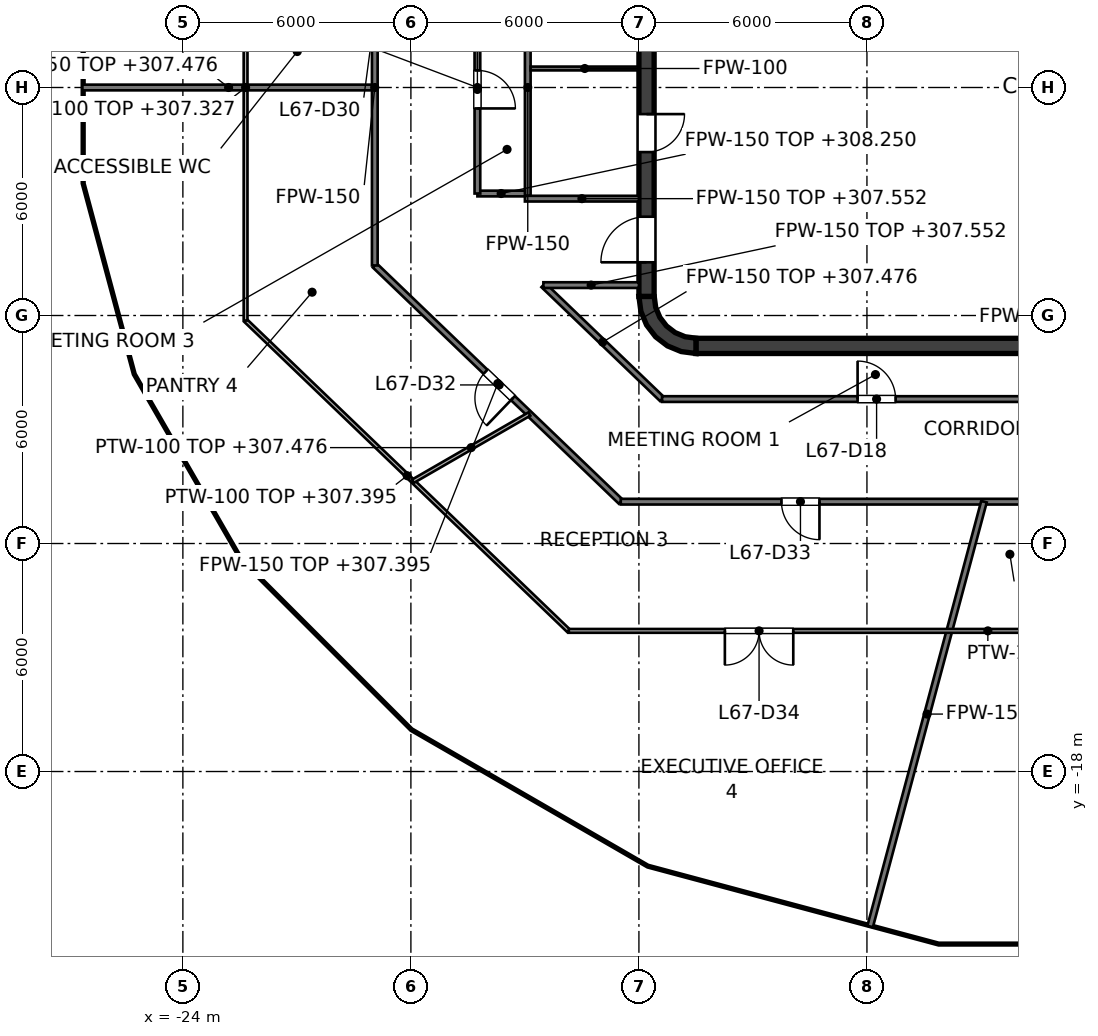
"""IFC4 building model, lengths in metres.
Left out: names, types, materials, properties, quantities, classifications, styles, units other than length and angle.
Written with IfcOpenShell. Run it as: python <this file> out.ifc"""

import sys

from ifc_helpers import new_model, si_unit, direction, frame, frame_2d, origin, place, context, subcontext, project, spatial, polyline, rectangle, outline, extrude, element, fill, save


model = new_model("IFC4")
c1 = context("Model", 3, precision=1e-05, world=origin(), true_north=direction((0.0, 1.0)))
c2 = subcontext(c1, "Body", "Model", "MODEL_VIEW")
j1 = project(units=[si_unit("LENGTHUNIT", "METRE"), si_unit("PLANEANGLEUNIT", "RADIAN")], contexts=[c1])
p1 = place(None, origin())
s1 = spatial("IfcSite", under=j1, at=p1, CompositionType="ELEMENT")
p2 = place(p1, origin())
s2 = spatial("IfcBuilding", under=s1, at=p2, CompositionType="ELEMENT")
p3 = place(p2, frame((0.0, 0.0, 304.4)))
s3 = spatial("IfcBuildingStorey", under=s2, at=p3, CompositionType="ELEMENT", Elevation=304.4)
p4 = place(p3, frame((-10.5, -6.8, 0.0), z_axis=(0.0, 0.0, 1.0), x_axis=(1.0, 0.0, 0.0)))
e1 = element("IfcWall", 1, at=p4, inside=s3, PredefinedType="SHEAR", context=c2, shape_type="SweptSolid", body=[
    extrude(rectangle(XDim=21.0, YDim=0.4, at=frame_2d((10.5, 0.0))), origin(), (0.0, 0.0, 1.0), 4.0),
])
p5 = place(p3, frame((-11.8, -5.5, 0.0), z_axis=(0.0, 0.0, 1.0), x_axis=(0.0, 1.0, 0.0)))
e2 = element("IfcWall", 2, at=p5, inside=s3, PredefinedType="SHEAR", context=c2, shape_type="SweptSolid", body=[
    extrude(rectangle(XDim=11.0, YDim=0.4, at=frame_2d((5.5, 0.0))), origin(), (0.0, 0.0, 1.0), 4.0),
])
p6 = place(p5, frame((3.8, 0.0, 0.0)))
e3 = element("IfcOpeningElement", 3, at=p6, cuts=e2, PredefinedType="OPENING", context=c2, shape_type="SweptSolid", body=[
    extrude(rectangle(XDim=1.0, YDim=2.1, at=frame_2d((0.5, 1.05))), frame((0.0, 0.2, 0.0), z_axis=(0.0, -1.0, 0.0), x_axis=(1.0, 0.0, 0.0)), (0.0, 0.0, 1.0), 0.4),
])
p7 = place(p5, frame((6.7, 0.0, 0.0)))
e4 = element("IfcOpeningElement", 4, at=p7, cuts=e2, PredefinedType="OPENING", context=c2, shape_type="SweptSolid", body=[
    extrude(rectangle(XDim=1.0, YDim=2.1, at=frame_2d((0.5, 1.05))), frame((0.0, 0.2, 0.0), z_axis=(0.0, -1.0, 0.0), x_axis=(1.0, 0.0, 0.0)), (0.0, 0.0, 1.0), 0.4),
])
p8 = place(p5, frame((0.9, 0.0, 0.0)))
e5 = element("IfcOpeningElement", 5, at=p8, cuts=e2, PredefinedType="OPENING", context=c2, shape_type="SweptSolid", body=[
    extrude(rectangle(XDim=1.2, YDim=2.1, at=frame_2d((0.6, 1.05))), frame((0.0, 0.2, 0.0), z_axis=(0.0, -1.0, 0.0), x_axis=(1.0, 0.0, 0.0)), (0.0, 0.0, 1.0), 0.4),
])
p9 = place(p5, frame((8.9, 0.0, 0.0)))
e6 = element("IfcOpeningElement", 6, at=p9, cuts=e2, PredefinedType="OPENING", context=c2, shape_type="SweptSolid", body=[
    extrude(rectangle(XDim=1.2, YDim=2.1, at=frame_2d((0.6, 1.05))), frame((0.0, 0.2, 0.0), z_axis=(0.0, -1.0, 0.0), x_axis=(1.0, 0.0, 0.0)), (0.0, 0.0, 1.0), 0.4),
])
p10 = place(p3, origin())
e7 = element("IfcWall", 7, at=p10, inside=s3, PredefinedType="SHEAR", context=c2, shape_type="SweptSolid", body=[
    extrude(outline(polyline([(-10.5, -7.0), (-10.5, -6.596), (-10.784, -6.559), (-11.048, -6.45), (-11.275, -6.275), (-11.45, -6.048), (-11.559, -5.784), (-11.596, -5.5), (-12.0, -5.5), (-11.949, -5.888), (-11.799, -6.25), (-11.561, -6.561), (-11.25, -6.799), (-10.888, -6.949), (-10.5, -7.0)])), origin(), (0.0, 0.0, 1.0), 4.0),
])
p11 = place(p3, frame((-9.0, -6.6, 0.0), z_axis=(0.0, 0.0, 1.0), x_axis=(0.0, 1.0, 0.0)))
e8 = element("IfcWall", 8, at=p11, inside=s3, PredefinedType="PARTITIONING", context=c2, shape_type="SweptSolid", body=[
    extrude(rectangle(XDim=2.5, YDim=0.25, at=frame_2d((1.25, 0.0))), origin(), (0.0, 0.0, 1.0), 3.85),
])
p12 = place(p11, frame((0.75, 0.0, 0.0)))
e9 = element("IfcOpeningElement", 9, at=p12, cuts=e8, PredefinedType="OPENING", context=c2, shape_type="SweptSolid", body=[
    extrude(rectangle(XDim=1.0, YDim=2.1, at=frame_2d((0.5, 1.05))), frame((0.0, 0.125, 0.0), z_axis=(0.0, -1.0, 0.0), x_axis=(1.0, 0.0, 0.0)), (0.0, 0.0, 1.0), 0.25),
])
p13 = place(p3, frame((-2.9, -6.6, 0.0), z_axis=(0.0, 0.0, 1.0), x_axis=(0.0, 1.0, 0.0)))
e10 = element("IfcWall", 10, at=p13, inside=s3, PredefinedType="PARTITIONING", context=c2, shape_type="SweptSolid", body=[
    extrude(rectangle(XDim=2.5, YDim=0.25, at=frame_2d((1.25, 0.0))), origin(), (0.0, 0.0, 1.0), 3.85),
])
p14 = place(p13, frame((0.8, 0.0, 0.0)))
e11 = element("IfcOpeningElement", 11, at=p14, cuts=e10, PredefinedType="OPENING", context=c2, shape_type="SweptSolid", body=[
    extrude(rectangle(XDim=0.9, YDim=2.1, at=frame_2d((0.45, 1.05))), frame((0.0, 0.125, 0.0), z_axis=(0.0, -1.0, 0.0), x_axis=(1.0, 0.0, 0.0)), (0.0, 0.0, 1.0), 0.25),
])
p15 = place(p3, frame((-9.125, -1.525, 0.0), z_axis=(0.0, 0.0, 1.0), x_axis=(1.0, 0.0, 0.0)))
e12 = element("IfcWall", 12, at=p15, inside=s3, PredefinedType="SOLIDWALL", context=c2, shape_type="SweptSolid", body=[
    extrude(rectangle(XDim=18.25, YDim=0.25, at=frame_2d((9.125, 0.0))), origin(), (0.0, 0.0, 1.0), 3.85),
])
p16 = place(p15, frame((7.15, 0.0, 0.0)))
e13 = element("IfcOpeningElement", 13, at=p16, cuts=e12, PredefinedType="OPENING", context=c2, shape_type="SweptSolid", body=[
    extrude(rectangle(XDim=1.2, YDim=2.1, at=frame_2d((0.6, 1.05))), frame((0.0, 0.125, 0.0), z_axis=(0.0, -1.0, 0.0), x_axis=(1.0, 0.0, 0.0)), (0.0, 0.0, 1.0), 0.25),
])
p17 = place(p15, frame((10.2, 0.0, 0.0)))
e14 = element("IfcOpeningElement", 14, at=p17, cuts=e12, PredefinedType="OPENING", context=c2, shape_type="SweptSolid", body=[
    extrude(rectangle(XDim=1.2, YDim=2.1, at=frame_2d((0.6, 1.05))), frame((0.0, 0.125, 0.0), z_axis=(0.0, -1.0, 0.0), x_axis=(1.0, 0.0, 0.0)), (0.0, 0.0, 1.0), 0.25),
])
p18 = place(p15, frame((16.075, 0.0, 0.0)))
e15 = element("IfcOpeningElement", 15, at=p18, cuts=e12, PredefinedType="OPENING", context=c2, shape_type="SweptSolid", body=[
    extrude(rectangle(XDim=1.0, YDim=2.1, at=frame_2d((0.5, 1.05))), frame((0.0, 0.125, 0.0), z_axis=(0.0, -1.0, 0.0), x_axis=(1.0, 0.0, 0.0)), (0.0, 0.0, 1.0), 0.25),
])
p19 = place(p3, frame((-9.125, -3.975, 0.0), z_axis=(0.0, 0.0, 1.0), x_axis=(1.0, 0.0, 0.0)))
e16 = element("IfcWall", 16, at=p19, inside=s3, PredefinedType="SOLIDWALL", context=c2, shape_type="SweptSolid", body=[
    extrude(rectangle(XDim=12.4, YDim=0.25, at=frame_2d((6.2, 0.0))), origin(), (0.0, 0.0, 1.0), 3.85),
])
p20 = place(p19, frame((1.05, 0.0, 0.0)))
e17 = element("IfcOpeningElement", 17, at=p20, cuts=e16, PredefinedType="OPENING", context=c2, shape_type="SweptSolid", body=[
    extrude(rectangle(XDim=1.2, YDim=2.1, at=frame_2d((0.6, 1.05))), frame((0.0, 0.125, 0.0), z_axis=(0.0, -1.0, 0.0), x_axis=(1.0, 0.0, 0.0)), (0.0, 0.0, 1.0), 0.25),
])
p21 = place(p19, frame((4.1, 0.0, 0.0)))
e18 = element("IfcOpeningElement", 18, at=p21, cuts=e16, PredefinedType="OPENING", context=c2, shape_type="SweptSolid", body=[
    extrude(rectangle(XDim=1.2, YDim=2.1, at=frame_2d((0.6, 1.05))), frame((0.0, 0.125, 0.0), z_axis=(0.0, -1.0, 0.0), x_axis=(1.0, 0.0, 0.0)), (0.0, 0.0, 1.0), 0.25),
])
for number, where, z_axis, x_axis in (
    (19, (-9.0, -3.85, 0.0), (0.0, 0.0, 1.0), (0.0, 1.0, 0.0)),
    (20, (-5.95, -3.85, 0.0), (0.0, 0.0, 1.0), (0.0, 1.0, 0.0)),
    (21, (-2.9, -3.85, 0.0), (0.0, 0.0, 1.0), (0.0, 1.0, 0.0)),
):
    element("IfcWall", number, at=place(p3, frame(where, z_axis=z_axis, x_axis=x_axis)), inside=s3, PredefinedType="SOLIDWALL", context=c2, shape_type="SweptSolid", body=[
        extrude(rectangle(XDim=2.2, YDim=0.25, at=frame_2d((1.1, 0.0))), origin(), (0.0, 0.0, 1.0), 3.85),
    ])
p22 = place(p3, frame((-14.925, -2.85, 0.0), z_axis=(0.0, 0.0, 1.0), x_axis=(0.0, 1.0, 0.0)))
e22 = element("IfcWall", 22, at=p22, inside=s3, PredefinedType="PARTITIONING", context=c2, shape_type="SweptSolid", body=[
    extrude(rectangle(XDim=5.7, YDim=0.15, at=frame_2d((2.85, 0.0))), origin(), (0.0, 0.0, 1.0), 2.927),
])
p23 = place(p3, frame((-15.0, -2.925, 0.0), z_axis=(0.0, 0.0, 1.0), x_axis=(1.0, 0.0, 0.0)))
e23 = element("IfcWall", 23, at=p23, inside=s3, PredefinedType="PARTITIONING", context=c2, shape_type="SweptSolid", body=[
    extrude(rectangle(XDim=3.0, YDim=0.15, at=frame_2d((1.5, 0.0))), origin(), (0.0, 0.0, 1.0), 3.152),
])
p24 = place(p3, frame((-14.85, 0.5, 0.0), z_axis=(0.0, 0.0, 1.0), x_axis=(1.0, 0.0, 0.0)))
e24 = element("IfcWall", 24, at=p24, inside=s3, PredefinedType="PARTITIONING", context=c2, shape_type="SweptSolid", body=[
    extrude(rectangle(XDim=2.85, YDim=0.1, at=frame_2d((1.425, 0.0))), origin(), (0.0, 0.0, 1.0), 3.85),
])
p25 = place(p3, frame((-18.95, -4.683, 0.0), z_axis=(0.0, 0.0, 1.0), x_axis=(0.72127259513, -0.692651314526, 0.0)))
e25 = element("IfcWall", 25, at=p25, inside=s3, PredefinedType="PARTITIONING", context=c2, shape_type="SweptSolid", body=[
    extrude(rectangle(XDim=8.974, YDim=0.15, at=frame_2d((4.487, 0.0))), origin(), (0.0, 0.0, 1.0), 2.995),
])
p26 = place(p25, frame((4.039, 0.0, 0.0)))
e26 = element("IfcOpeningElement", 26, at=p26, cuts=e25, PredefinedType="OPENING", context=c2, shape_type="SweptSolid", body=[
    extrude(rectangle(XDim=1.0, YDim=2.1, at=frame_2d((0.5, 1.05))), frame((0.0, 0.075, 0.0), z_axis=(0.0, -1.0, 0.0), x_axis=(1.0, 0.0, 0.0)), (0.0, 0.0, 1.0), 0.15),
])
p27 = place(p3, frame((-14.514, -5.2, 0.0), z_axis=(0.0, 0.0, 1.0), x_axis=(0.721228427004, -0.692697304803, 0.0)))
e27 = element("IfcWall", 27, at=p27, inside=s3, PredefinedType="PARTITIONING", context=c2, shape_type="SweptSolid", body=[
    extrude(rectangle(XDim=4.33, YDim=0.15, at=frame_2d((2.165, 0.0))), origin(), (0.0, 0.0, 1.0), 3.076),
])
p28 = place(p3, frame((-12.478, -10.899, 0.0), z_axis=(0.0, 0.0, 1.0), x_axis=(1.0, 0.0, 0.0)))
e28 = element("IfcWall", 28, at=p28, inside=s3, PredefinedType="PARTITIONING", context=c2, shape_type="SweptSolid", body=[
    extrude(rectangle(XDim=24.956, YDim=0.15, at=frame_2d((12.478, 0.0))), origin(), (0.0, 0.0, 1.0), 2.927),
])
p29 = place(p28, frame((4.229, 0.0, 0.0)))
e29 = element("IfcOpeningElement", 29, at=p29, cuts=e28, PredefinedType="OPENING", context=c2, shape_type="SweptSolid", body=[
    extrude(rectangle(XDim=1.0, YDim=2.1, at=frame_2d((0.5, 1.05))), frame((0.0, 0.075, 0.0), z_axis=(0.0, -1.0, 0.0), x_axis=(1.0, 0.0, 0.0)), (0.0, 0.0, 1.0), 0.15),
])
p30 = place(p28, frame((11.979, 0.0, 0.0)))
e30 = element("IfcOpeningElement", 30, at=p30, cuts=e28, PredefinedType="OPENING", context=c2, shape_type="SweptSolid", body=[
    extrude(rectangle(XDim=1.0, YDim=2.1, at=frame_2d((0.5, 1.05))), frame((0.0, 0.075, 0.0), z_axis=(0.0, -1.0, 0.0), x_axis=(1.0, 0.0, 0.0)), (0.0, 0.0, 1.0), 0.15),
])
p31 = place(p28, frame((19.627, 0.0, 0.0)))
e31 = element("IfcOpeningElement", 31, at=p31, cuts=e28, PredefinedType="OPENING", context=c2, shape_type="SweptSolid", body=[
    extrude(rectangle(XDim=1.0, YDim=2.1, at=frame_2d((0.5, 1.05))), frame((0.0, 0.075, 0.0), z_axis=(0.0, -1.0, 0.0), x_axis=(1.0, 0.0, 0.0)), (0.0, 0.0, 1.0), 0.15),
])
p32 = place(p3, frame((-11.391, -8.199, 0.0), z_axis=(0.0, 0.0, 1.0), x_axis=(1.0, 0.0, 0.0)))
e32 = element("IfcWall", 32, at=p32, inside=s3, PredefinedType="PARTITIONING", context=c2, shape_type="SweptSolid", body=[
    extrude(rectangle(XDim=22.782, YDim=0.15, at=frame_2d((11.391, 0.0))), origin(), (0.0, 0.0, 1.0), 2.927),
])
p33 = place(p32, frame((5.145, 0.0, 0.0)))
e33 = element("IfcOpeningElement", 33, at=p33, cuts=e32, PredefinedType="OPENING", context=c2, shape_type="SweptSolid", body=[
    extrude(rectangle(XDim=1.0, YDim=2.1, at=frame_2d((0.5, 1.05))), frame((0.0, 0.075, 0.0), z_axis=(0.0, -1.0, 0.0), x_axis=(1.0, 0.0, 0.0)), (0.0, 0.0, 1.0), 0.15),
])
p34 = place(p32, frame((16.536, 0.0, 0.0)))
e34 = element("IfcOpeningElement", 34, at=p34, cuts=e32, PredefinedType="OPENING", context=c2, shape_type="SweptSolid", body=[
    extrude(rectangle(XDim=1.0, YDim=2.1, at=frame_2d((0.5, 1.05))), frame((0.0, 0.075, 0.0), z_axis=(0.0, -1.0, 0.0), x_axis=(1.0, 0.0, 0.0)), (0.0, 0.0, 1.0), 0.15),
])
p35 = place(p3, frame((-14.514, -5.2, 0.0), z_axis=(0.0, 0.0, 1.0), x_axis=(1.0, 0.0, 0.0)))
e35 = element("IfcWall", 35, at=p35, inside=s3, PredefinedType="PARTITIONING", context=c2, shape_type="SweptSolid", body=[
    extrude(rectangle(XDim=2.514, YDim=0.15, at=frame_2d((1.257, 0.0))), origin(), (0.0, 0.0, 1.0), 3.152),
])
p36 = place(p3, frame((-16.25, -2.79, 0.0), z_axis=(0.0, 0.0, 1.0), x_axis=(1.0, 0.0, 0.0)))
e36 = element("IfcWall", 36, at=p36, inside=s3, PredefinedType="PARTITIONING", context=c2, shape_type="SweptSolid", body=[
    extrude(rectangle(XDim=1.25, YDim=0.15, at=frame_2d((0.625, 0.0))), origin(), (0.0, 0.0, 1.0), 3.85),
])
p37 = place(p3, frame((-26.644, 0.0, 0.0), z_axis=(0.0, 0.0, 1.0), x_axis=(1.0, 0.0, 0.0)))
e37 = element("IfcWall", 37, at=p37, inside=s3, PredefinedType="PARTITIONING", context=c2, shape_type="SweptSolid", body=[
    extrude(rectangle(XDim=7.694, YDim=0.15, at=frame_2d((3.847, 0.0))), origin(), (0.0, 0.0, 1.0), 3.076),
])
p38 = place(p3, frame((-5.916, -22.078, 0.0), z_axis=(0.0, 0.0, 1.0), x_axis=(0.258855937104, 0.965915940352, 0.0)))
e38 = element("IfcWall", 38, at=p38, inside=s3, PredefinedType="PARTITIONING", context=c2, shape_type="SweptSolid", body=[
    extrude(rectangle(XDim=11.573, YDim=0.15, at=frame_2d((5.787, 0.0))), origin(), (0.0, 0.0, 1.0), 3.424),
])
p39 = place(p3, frame((-16.25, -2.79, 0.0), z_axis=(0.0, 0.0, 1.0), x_axis=(0.0, 1.0, 0.0)))
e39 = element("IfcWall", 39, at=p39, inside=s3, PredefinedType="PARTITIONING", context=c2, shape_type="SweptSolid", body=[
    extrude(rectangle(XDim=5.58, YDim=0.15, at=frame_2d((2.79, 0.0))), origin(), (0.0, 0.0, 1.0), 2.927),
])
p40 = place(p39, frame((2.239, 0.0, 0.0)))
e40 = element("IfcOpeningElement", 40, at=p40, cuts=e39, PredefinedType="OPENING", context=c2, shape_type="SweptSolid", body=[
    extrude(rectangle(XDim=1.0, YDim=2.1, at=frame_2d((0.5, 1.05))), frame((0.0, 0.075, 0.0), z_axis=(0.0, -1.0, 0.0), x_axis=(1.0, 0.0, 0.0)), (0.0, 0.0, 1.0), 0.15),
])
p41 = place(p3, frame((-18.95, -4.683, 0.0), z_axis=(0.0, 0.0, 1.0), x_axis=(0.0, 1.0, 0.0)))
e41 = element("IfcWall", 41, at=p41, inside=s3, PredefinedType="PARTITIONING", context=c2, shape_type="SweptSolid", body=[
    extrude(rectangle(XDim=9.366, YDim=0.15, at=frame_2d((4.683, 0.0))), origin(), (0.0, 0.0, 1.0), 2.927),
])
p42 = place(p41, frame((6.088, 0.0, 0.0)))
e42 = element("IfcOpeningElement", 42, at=p42, cuts=e41, PredefinedType="OPENING", context=c2, shape_type="SweptSolid", body=[
    extrude(rectangle(XDim=1.0, YDim=2.1, at=frame_2d((0.5, 1.05))), frame((0.0, 0.075, 0.0), z_axis=(0.0, -1.0, 0.0), x_axis=(1.0, 0.0, 0.0)), (0.0, 0.0, 1.0), 0.15),
])
p43 = place(p3, frame((-22.35, -6.132, 0.0), z_axis=(0.0, 0.0, 1.0), x_axis=(0.72117874289, -0.692749031615, 0.0)))
e43 = element("IfcWall", 43, at=p43, inside=s3, PredefinedType="PARTITIONING", context=c2, shape_type="SweptSolid", body=[
    extrude(rectangle(XDim=11.791, YDim=0.1, at=frame_2d((5.896, 0.0))), origin(), (0.0, 0.0, 1.0), 2.995),
])
p44 = place(p3, frame((-13.846, -14.299, 0.0), z_axis=(0.0, 0.0, 1.0), x_axis=(1.0, 0.0, 0.0)))
e44 = element("IfcWall", 44, at=p44, inside=s3, PredefinedType="PARTITIONING", context=c2, shape_type="SweptSolid", body=[
    extrude(rectangle(XDim=22.055, YDim=0.1, at=frame_2d((11.027, 0.0))), origin(), (0.0, 0.0, 1.0), 2.927),
])
p45 = place(p44, frame((4.107, 0.0, 0.0)))
e45 = element("IfcOpeningElement", 45, at=p45, cuts=e44, PredefinedType="OPENING", context=c2, shape_type="SweptSolid", body=[
    extrude(rectangle(XDim=1.8, YDim=2.1, at=frame_2d((0.9, 1.05))), frame((0.0, 0.05, 0.0), z_axis=(0.0, -1.0, 0.0), x_axis=(1.0, 0.0, 0.0)), (0.0, 0.0, 1.0), 0.1),
])
p46 = place(p44, frame((19.417, 0.0, 0.0)))
e46 = element("IfcOpeningElement", 46, at=p46, cuts=e44, PredefinedType="OPENING", context=c2, shape_type="SweptSolid", body=[
    extrude(rectangle(XDim=0.9, YDim=2.1, at=frame_2d((0.45, 1.05))), frame((0.0, 0.05, 0.0), z_axis=(0.0, -1.0, 0.0), x_axis=(1.0, 0.0, 0.0)), (0.0, 0.0, 1.0), 0.1),
])
p47 = place(p3, frame((-17.946, -10.361, 0.0), z_axis=(0.0, 0.0, 1.0), x_axis=(0.866086794771, 0.499893652614, 0.0)))
e47 = element("IfcWall", 47, at=p47, inside=s3, PredefinedType="PARTITIONING", context=c2, shape_type="SweptSolid", body=[
    extrude(rectangle(XDim=3.539, YDim=0.1, at=frame_2d((1.77, 0.0))), origin(), (0.0, 0.0, 1.0), 3.076),
])
p48 = place(p3, frame((-22.35, -6.132, 0.0), z_axis=(0.0, 0.0, 1.0), x_axis=(0.0, 1.0, 0.0)))
e48 = element("IfcWall", 48, at=p48, inside=s3, PredefinedType="PARTITIONING", context=c2, shape_type="SweptSolid", body=[
    extrude(rectangle(XDim=12.264, YDim=0.1, at=frame_2d((6.132, 0.0))), origin(), (0.0, 0.0, 1.0), 2.927),
])
p49 = place(p20, origin())
e49 = element("IfcDoor", 49, at=p49, inside=s3, OperationType="DOUBLE_DOOR_SLIDING", PredefinedType="DOOR", context=c2, shape_type="SweptSolid", body=[
    extrude(rectangle(XDim=1.2, YDim=2.1, at=frame_2d((0.6, 1.05))), frame((0.0, 0.025, 0.0), z_axis=(0.0, -1.0, 0.0), x_axis=(1.0, 0.0, 0.0)), (0.0, 0.0, 1.0), 0.05),
])
fill(e17, e49)
p50 = place(p21, origin())
e50 = element("IfcDoor", 50, at=p50, inside=s3, OperationType="DOUBLE_DOOR_SLIDING", PredefinedType="DOOR", context=c2, shape_type="SweptSolid", body=[
    extrude(rectangle(XDim=1.2, YDim=2.1, at=frame_2d((0.6, 1.05))), frame((0.0, 0.025, 0.0), z_axis=(0.0, -1.0, 0.0), x_axis=(1.0, 0.0, 0.0)), (0.0, 0.0, 1.0), 0.05),
])
fill(e18, e50)
p51 = place(p12, origin())
e51 = element("IfcDoor", 51, at=p51, inside=s3, OperationType="SINGLE_SWING_LEFT", PredefinedType="DOOR", context=c2, shape_type="SweptSolid", body=[
    extrude(rectangle(XDim=1.0, YDim=2.1, at=frame_2d((0.5, 1.05))), frame((0.0, 0.025, 0.0), z_axis=(0.0, -1.0, 0.0), x_axis=(1.0, 0.0, 0.0)), (0.0, 0.0, 1.0), 0.05),
])
fill(e9, e51)
p52 = place(p14, origin())
e52 = element("IfcDoor", 52, at=p52, inside=s3, OperationType="SINGLE_SWING_RIGHT", PredefinedType="DOOR", context=c2, shape_type="SweptSolid", body=[
    extrude(rectangle(XDim=0.9, YDim=2.1, at=frame_2d((0.45, 1.05))), frame((0.0, 0.025, 0.0), z_axis=(0.0, -1.0, 0.0), x_axis=(1.0, 0.0, 0.0)), (0.0, 0.0, 1.0), 0.05),
])
fill(e11, e52)
p53 = place(p6, origin())
e53 = element("IfcDoor", 53, at=p53, inside=s3, OperationType="SINGLE_SWING_RIGHT", PredefinedType="DOOR", context=c2, shape_type="SweptSolid", body=[
    extrude(rectangle(XDim=1.0, YDim=2.1, at=frame_2d((0.5, 1.05))), frame((0.0, 0.025, 0.0), z_axis=(0.0, -1.0, 0.0), x_axis=(1.0, 0.0, 0.0)), (0.0, 0.0, 1.0), 0.05),
])
fill(e3, e53)
p54 = place(p8, origin())
e54 = element("IfcDoor", 54, at=p54, inside=s3, OperationType="SINGLE_SWING_LEFT", PredefinedType="DOOR", context=c2, shape_type="SweptSolid", body=[
    extrude(rectangle(XDim=1.2, YDim=2.1, at=frame_2d((0.6, 1.05))), frame((0.0, 0.025, 0.0), z_axis=(0.0, -1.0, 0.0), x_axis=(1.0, 0.0, 0.0)), (0.0, 0.0, 1.0), 0.05),
])
fill(e5, e54)
p55 = place(p33, origin())
e55 = element("IfcDoor", 55, at=p55, inside=s3, OperationType="SINGLE_SWING_LEFT", PredefinedType="DOOR", context=c2, shape_type="SweptSolid", body=[
    extrude(rectangle(XDim=1.0, YDim=2.1, at=frame_2d((0.5, 1.05))), frame((0.0, 0.025, 0.0), z_axis=(0.0, -1.0, 0.0), x_axis=(1.0, 0.0, 0.0)), (0.0, 0.0, 1.0), 0.05),
])
fill(e33, e55)
p56 = place(p40, origin())
e56 = element("IfcDoor", 56, at=p56, inside=s3, OperationType="SINGLE_SWING_LEFT", PredefinedType="DOOR", context=c2, shape_type="SweptSolid", body=[
    extrude(rectangle(XDim=1.0, YDim=2.1, at=frame_2d((0.5, 1.05))), frame((0.0, 0.025, 0.0), z_axis=(0.0, -1.0, 0.0), x_axis=(1.0, 0.0, 0.0)), (0.0, 0.0, 1.0), 0.05),
])
fill(e40, e56)
p57 = place(p26, origin())
e57 = element("IfcDoor", 57, at=p57, inside=s3, OperationType="SINGLE_SWING_RIGHT", PredefinedType="DOOR", context=c2, shape_type="SweptSolid", body=[
    extrude(rectangle(XDim=1.0, YDim=2.1, at=frame_2d((0.5, 1.05))), frame((0.0, 0.025, 0.0), z_axis=(0.0, -1.0, 0.0), x_axis=(1.0, 0.0, 0.0)), (0.0, 0.0, 1.0), 0.05),
])
fill(e26, e57)
p58 = place(p29, origin())
e58 = element("IfcDoor", 58, at=p58, inside=s3, OperationType="SINGLE_SWING_RIGHT", PredefinedType="DOOR", context=c2, shape_type="SweptSolid", body=[
    extrude(rectangle(XDim=1.0, YDim=2.1, at=frame_2d((0.5, 1.05))), frame((0.0, 0.025, 0.0), z_axis=(0.0, -1.0, 0.0), x_axis=(1.0, 0.0, 0.0)), (0.0, 0.0, 1.0), 0.05),
])
fill(e29, e58)
p59 = place(p45, origin())
e59 = element("IfcDoor", 59, at=p59, inside=s3, OperationType="DOUBLE_DOOR_SINGLE_SWING", PredefinedType="DOOR", context=c2, shape_type="SweptSolid", body=[
    extrude(rectangle(XDim=1.8, YDim=2.1, at=frame_2d((0.9, 1.05))), frame((0.0, 0.025, 0.0), z_axis=(0.0, -1.0, 0.0), x_axis=(1.0, 0.0, 0.0)), (0.0, 0.0, 1.0), 0.05),
])
fill(e45, e59)
save(model, sys.argv[1])
